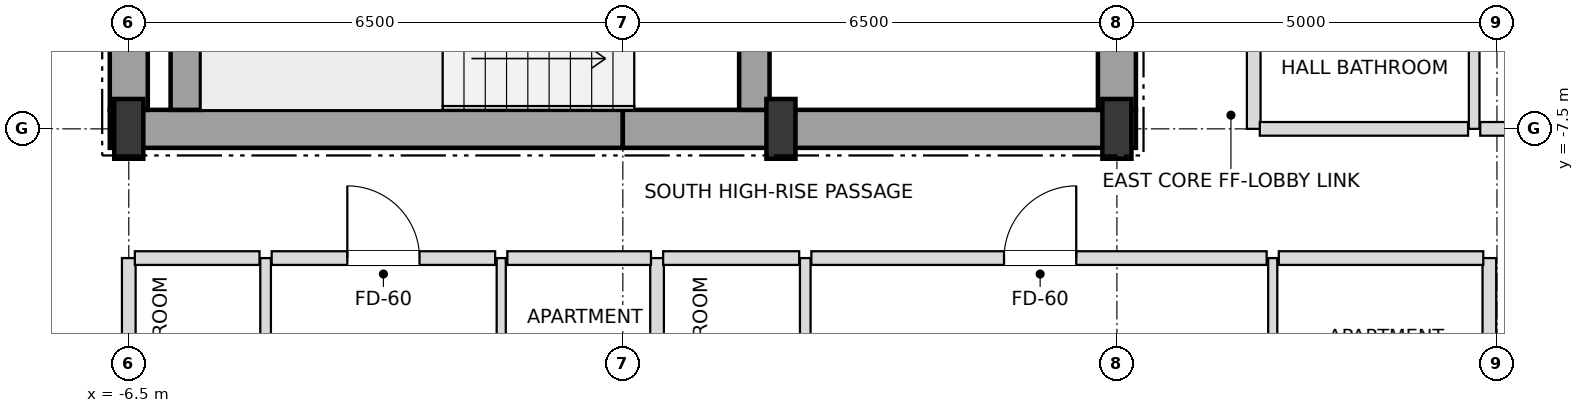
"""IFC4 building model, lengths in metres.
Left out: names, types, materials, properties, quantities, classifications, styles, units other than length and angle.
Written with IfcOpenShell. Run it as: python <this file> out.ifc"""

import sys

from ifc_helpers import new_model, si_unit, direction, frame, frame_2d, origin, origin_2d, place, context, subcontext, project, spatial, rectangle, i_section, extrude, element, fill, save


model = new_model("IFC4")
c1 = context("Model", 3, precision=1e-05, world=origin(), true_north=direction((0.0, 1.0)))
c2 = subcontext(c1, "Body", "Model", "MODEL_VIEW")
j1 = project(units=[si_unit("LENGTHUNIT", "METRE"), si_unit("PLANEANGLEUNIT", "RADIAN")], contexts=[c1])
p1 = place(None, origin())
s1 = spatial("IfcSite", under=j1, at=p1, CompositionType="ELEMENT")
p2 = place(p1, origin())
s2 = spatial("IfcBuilding", under=s1, at=p2, CompositionType="ELEMENT")
p3 = place(p2, frame((0.0, 0.0, 229.5)))
s3 = spatial("IfcBuildingStorey", under=s2, at=p3, CompositionType="ELEMENT", Elevation=229.5)
for number, where, z_axis, x_axis in (
    (1, (-6.5, -7.5, 0.0), (0.0, 0.0, 1.0), (1.0, 0.0, 0.0)),
    (2, (2.08, -7.5, 0.0), (0.0, 0.0, 1.0), (1.0, 0.0, 0.0)),
    (3, (6.5, -7.5, 0.0), (0.0, 0.0, 1.0), (1.0, 0.0, 0.0)),
):
    element("IfcColumn", number, at=place(p3, frame(where, z_axis=z_axis, x_axis=x_axis)), inside=s3, PredefinedType="COLUMN", context=c2, shape_type="SweptSolid", body=[
        extrude(i_section(OverallWidth=0.382, OverallDepth=0.786, WebThickness=0.02, FlangeThickness=0.033, at=origin_2d()), origin(), (0.0, 0.0, 1.0), 3.6),
    ])
for number, where, z_axis, x_axis in (
    (4, (-6.75, -7.5, 0.0), (0.0, 0.0, 1.0), (1.0, 0.0, 0.0)),
    (5, (0.0, -7.5, 0.0), (0.0, 0.0, 1.0), (1.0, 0.0, 0.0)),
):
    element("IfcWall", number, at=place(p3, frame(where, z_axis=z_axis, x_axis=x_axis)), inside=s3, PredefinedType="SHEAR", context=c2, shape_type="SweptSolid", body=[
        extrude(rectangle(XDim=6.75, YDim=0.5, at=frame_2d((3.375, 0.0))), origin(), (0.0, 0.0, 1.0), 3.38),
    ])
p4 = place(p3, frame((-6.5, -7.25, 0.0), z_axis=(0.0, 0.0, 1.0), x_axis=(0.0, 1.0, 0.0)))
e6 = element("IfcWall", 6, at=p4, inside=s3, PredefinedType="SHEAR", context=c2, shape_type="SweptSolid", body=[
    extrude(rectangle(XDim=3.55, YDim=0.5, at=frame_2d((1.775, 0.0))), origin(), (0.0, 0.0, 1.0), 3.38),
])
p5 = place(p3, frame((6.5, -7.25, 0.0), z_axis=(0.0, 0.0, 1.0), x_axis=(0.0, 1.0, 0.0)))
e7 = element("IfcWall", 7, at=p5, inside=s3, PredefinedType="SHEAR", context=c2, shape_type="SweptSolid", body=[
    extrude(rectangle(XDim=5.75, YDim=0.5, at=frame_2d((2.875, 0.0))), origin(), (0.0, 0.0, 1.0), 3.38),
])
p6 = place(p5, frame((0.85, 0.0, 0.0)))
e8 = element("IfcOpeningElement", 8, at=p6, cuts=e7, PredefinedType="OPENING", context=c2, shape_type="SweptSolid", body=[
    extrude(rectangle(XDim=1.05, YDim=2.15, at=frame_2d((0.525, 1.075))), frame((0.0, 0.26, 0.0), z_axis=(0.0, -1.0, 0.0), x_axis=(1.0, 0.0, 0.0)), (0.0, 0.0, 1.0), 0.52),
])
p7 = place(p3, frame((-5.75, -7.25, 0.0), z_axis=(0.0, 0.0, 1.0), x_axis=(0.0, 1.0, 0.0)))
e9 = element("IfcWall", 9, at=p7, inside=s3, PredefinedType="SHEAR", context=c2, shape_type="SweptSolid", body=[
    extrude(rectangle(XDim=2.9, YDim=0.4, at=frame_2d((1.45, 0.0))), origin(), (0.0, 0.0, 1.0), 3.38),
])
p8 = place(p3, frame((1.73, -7.25, 0.0), z_axis=(0.0, 0.0, 1.0), x_axis=(0.0, 1.0, 0.0)))
e10 = element("IfcWall", 10, at=p8, inside=s3, PredefinedType="SHEAR", context=c2, shape_type="SweptSolid", body=[
    extrude(rectangle(XDim=3.3, YDim=0.4, at=frame_2d((1.65, 0.0))), origin(), (0.0, 0.0, 1.0), 3.38),
])
p9 = place(p8, frame((0.9, 0.0, 0.0)))
e11 = element("IfcOpeningElement", 11, at=p9, cuts=e10, PredefinedType="OPENING", context=c2, shape_type="SweptSolid", body=[
    extrude(rectangle(XDim=1.05, YDim=2.15, at=frame_2d((0.525, 1.075))), frame((0.0, 0.21, 0.0), z_axis=(0.0, -1.0, 0.0), x_axis=(1.0, 0.0, 0.0)), (0.0, 0.0, 1.0), 0.42),
])
p10 = place(p3, frame((-6.5, -19.9, 0.0), z_axis=(0.0, 0.0, 1.0), x_axis=(0.0, 1.0, 0.0)))
e12 = element("IfcWall", 12, at=p10, inside=s3, PredefinedType="PARTITIONING", context=c2, shape_type="SweptSolid", body=[
    extrude(rectangle(XDim=10.7, YDim=0.18, at=frame_2d((5.35, 0.0))), origin(), (0.0, 0.0, 1.0), 2.826),
])
p11 = place(p3, frame((-4.7, -13.9, 0.0), z_axis=(0.0, 0.0, 1.0), x_axis=(0.0, 1.0, 0.0)))
e13 = element("IfcWall", 13, at=p11, inside=s3, PredefinedType="PARTITIONING", context=c2, shape_type="SweptSolid", body=[
    extrude(rectangle(XDim=4.7, YDim=0.14, at=frame_2d((2.35, 0.0))), origin(), (0.0, 0.0, 1.0), 3.38),
])
p12 = place(p11, frame((1.9, 0.0, 0.0)))
e14 = element("IfcOpeningElement", 14, at=p12, cuts=e13, PredefinedType="OPENING", context=c2, shape_type="SweptSolid", body=[
    extrude(rectangle(XDim=0.9, YDim=2.1, at=frame_2d((0.45, 1.05))), frame((0.0, 0.08, 0.0), z_axis=(0.0, -1.0, 0.0), x_axis=(1.0, 0.0, 0.0)), (0.0, 0.0, 1.0), 0.16),
])
p13 = place(p3, frame((-1.6, -13.9, 0.0), z_axis=(0.0, 0.0, 1.0), x_axis=(0.0, 1.0, 0.0)))
e15 = element("IfcWall", 15, at=p13, inside=s3, PredefinedType="PARTITIONING", context=c2, shape_type="SweptSolid", body=[
    extrude(rectangle(XDim=4.7, YDim=0.12, at=frame_2d((2.35, 0.0))), origin(), (0.0, 0.0, 1.0), 3.38),
])
p14 = place(p13, frame((1.875, 0.0, 0.0)))
e16 = element("IfcOpeningElement", 16, at=p14, cuts=e15, PredefinedType="OPENING", context=c2, shape_type="SweptSolid", body=[
    extrude(rectangle(XDim=0.95, YDim=2.1, at=frame_2d((0.475, 1.05))), frame((0.0, 0.07, 0.0), z_axis=(0.0, -1.0, 0.0), x_axis=(1.0, 0.0, 0.0)), (0.0, 0.0, 1.0), 0.14),
])
p15 = place(p3, frame((0.45, -19.9, 0.0), z_axis=(0.0, 0.0, 1.0), x_axis=(0.0, 1.0, 0.0)))
e17 = element("IfcWall", 17, at=p15, inside=s3, PredefinedType="PARTITIONING", context=c2, shape_type="SweptSolid", body=[
    extrude(rectangle(XDim=10.7, YDim=0.18, at=frame_2d((5.35, 0.0))), origin(), (0.0, 0.0, 1.0), 3.018),
])
p16 = place(p3, frame((2.4, -13.9, 0.0), z_axis=(0.0, 0.0, 1.0), x_axis=(0.0, 1.0, 0.0)))
e18 = element("IfcWall", 18, at=p16, inside=s3, PredefinedType="PARTITIONING", context=c2, shape_type="SweptSolid", body=[
    extrude(rectangle(XDim=4.7, YDim=0.14, at=frame_2d((2.35, 0.0))), origin(), (0.0, 0.0, 1.0), 3.38),
])
p17 = place(p16, frame((1.9, 0.0, 0.0)))
e19 = element("IfcOpeningElement", 19, at=p17, cuts=e18, PredefinedType="OPENING", context=c2, shape_type="SweptSolid", body=[
    extrude(rectangle(XDim=0.9, YDim=2.1, at=frame_2d((0.45, 1.05))), frame((0.0, 0.08, 0.0), z_axis=(0.0, -1.0, 0.0), x_axis=(1.0, 0.0, 0.0)), (0.0, 0.0, 1.0), 0.16),
])
p18 = place(p3, frame((8.3, -7.5, 0.0), z_axis=(0.0, 0.0, 1.0), x_axis=(0.0, 1.0, 0.0)))
e20 = element("IfcWall", 20, at=p18, inside=s3, PredefinedType="PARTITIONING", context=c2, shape_type="SweptSolid", body=[
    extrude(rectangle(XDim=15.0, YDim=0.18, at=frame_2d((7.5, 0.0))), origin(), (0.0, 0.0, 1.0), 3.38),
])
p19 = place(p18, frame((2.355, 0.0, 0.0)))
e21 = element("IfcOpeningElement", 21, at=p19, cuts=e20, PredefinedType="OPENING", context=c2, shape_type="SweptSolid", body=[
    extrude(rectangle(XDim=0.95, YDim=2.15, at=frame_2d((0.475, 1.075))), frame((0.0, 0.1, 0.0), z_axis=(0.0, -1.0, 0.0), x_axis=(1.0, 0.0, 0.0)), (0.0, 0.0, 1.0), 0.2),
])
p20 = place(p3, frame((8.55, -19.9, 0.0), z_axis=(0.0, 0.0, 1.0), x_axis=(0.0, 1.0, 0.0)))
e22 = element("IfcWall", 22, at=p20, inside=s3, PredefinedType="PARTITIONING", context=c2, shape_type="SweptSolid", body=[
    extrude(rectangle(XDim=10.7, YDim=0.12, at=frame_2d((5.35, 0.0))), origin(), (0.0, 0.0, 1.0), 2.826),
])
p21 = place(p20, frame((7.875, 0.0, 0.0)))
e23 = element("IfcOpeningElement", 23, at=p21, cuts=e22, PredefinedType="OPENING", context=c2, shape_type="SweptSolid", body=[
    extrude(rectangle(XDim=0.95, YDim=2.1, at=frame_2d((0.475, 1.05))), frame((0.0, 0.07, 0.0), z_axis=(0.0, -1.0, 0.0), x_axis=(1.0, 0.0, 0.0)), (0.0, 0.0, 1.0), 0.14),
])
p22 = place(p20, frame((2.55, 0.0, 0.0)))
e24 = element("IfcOpeningElement", 24, at=p22, cuts=e22, PredefinedType="OPENING", context=c2, shape_type="SweptSolid", body=[
    extrude(rectangle(XDim=0.9, YDim=2.1, at=frame_2d((0.45, 1.05))), frame((0.0, 0.07, 0.0), z_axis=(0.0, -1.0, 0.0), x_axis=(1.0, 0.0, 0.0)), (0.0, 0.0, 1.0), 0.14),
])
p23 = place(p3, frame((11.2, -7.5, 0.0), z_axis=(0.0, 0.0, 1.0), x_axis=(0.0, 1.0, 0.0)))
e25 = element("IfcWall", 25, at=p23, inside=s3, PredefinedType="PARTITIONING", context=c2, shape_type="SweptSolid", body=[
    extrude(rectangle(XDim=15.0, YDim=0.14, at=frame_2d((7.5, 0.0))), origin(), (0.0, 0.0, 1.0), 3.38),
])
p24 = place(p23, frame((3.475, 0.0, 0.0)))
e26 = element("IfcOpeningElement", 26, at=p24, cuts=e25, PredefinedType="OPENING", context=c2, shape_type="SweptSolid", body=[
    extrude(rectangle(XDim=0.95, YDim=2.1, at=frame_2d((0.475, 1.05))), frame((0.0, 0.08, 0.0), z_axis=(0.0, -1.0, 0.0), x_axis=(1.0, 0.0, 0.0)), (0.0, 0.0, 1.0), 0.16),
])
p25 = place(p3, frame((11.4, -14.27, 0.0), z_axis=(0.0, 0.0, 1.0), x_axis=(0.0, 1.0, 0.0)))
e27 = element("IfcWall", 27, at=p25, inside=s3, PredefinedType="PARTITIONING", context=c2, shape_type="SweptSolid", body=[
    extrude(rectangle(XDim=5.07, YDim=0.18, at=frame_2d((2.535, 0.0))), origin(), (0.0, 0.0, 1.0), 2.748),
])
p26 = place(p3, frame((-6.42, -9.2, 0.0), z_axis=(0.0, 0.0, 1.0), x_axis=(1.0, 0.0, 0.0)))
e28 = element("IfcWall", 28, at=p26, inside=s3, PredefinedType="PARTITIONING", context=c2, shape_type="SweptSolid", body=[
    extrude(rectangle(XDim=1.64, YDim=0.18, at=frame_2d((0.82, 0.0))), origin(), (0.0, 0.0, 1.0), 3.38),
])
p27 = place(p3, frame((-4.62, -9.2, 0.0), z_axis=(0.0, 0.0, 1.0), x_axis=(1.0, 0.0, 0.0)))
e29 = element("IfcWall", 29, at=p27, inside=s3, PredefinedType="PARTITIONING", context=c2, shape_type="SweptSolid", body=[
    extrude(rectangle(XDim=2.94, YDim=0.18, at=frame_2d((1.47, 0.0))), origin(), (0.0, 0.0, 1.0), 3.38),
])
p28 = place(p27, frame((0.995, 0.0, 0.0)))
e30 = element("IfcOpeningElement", 30, at=p28, cuts=e29, PredefinedType="OPENING", context=c2, shape_type="SweptSolid", body=[
    extrude(rectangle(XDim=0.95, YDim=2.15, at=frame_2d((0.475, 1.075))), frame((0.0, 0.1, 0.0), z_axis=(0.0, -1.0, 0.0), x_axis=(1.0, 0.0, 0.0)), (0.0, 0.0, 1.0), 0.2),
])
p29 = place(p3, frame((-1.52, -9.2, 0.0), z_axis=(0.0, 0.0, 1.0), x_axis=(1.0, 0.0, 0.0)))
e31 = element("IfcWall", 31, at=p29, inside=s3, PredefinedType="PARTITIONING", context=c2, shape_type="SweptSolid", body=[
    extrude(rectangle(XDim=1.89, YDim=0.18, at=frame_2d((0.945, 0.0))), origin(), (0.0, 0.0, 1.0), 3.38),
])
p30 = place(p3, frame((0.53, -9.2, 0.0), z_axis=(0.0, 0.0, 1.0), x_axis=(1.0, 0.0, 0.0)))
e32 = element("IfcWall", 32, at=p30, inside=s3, PredefinedType="PARTITIONING", context=c2, shape_type="SweptSolid", body=[
    extrude(rectangle(XDim=1.79, YDim=0.18, at=frame_2d((0.895, 0.0))), origin(), (0.0, 0.0, 1.0), 3.38),
])
p31 = place(p3, frame((2.48, -9.2, 0.0), z_axis=(0.0, 0.0, 1.0), x_axis=(1.0, 0.0, 0.0)))
e33 = element("IfcWall", 33, at=p31, inside=s3, PredefinedType="PARTITIONING", context=c2, shape_type="SweptSolid", body=[
    extrude(rectangle(XDim=5.99, YDim=0.18, at=frame_2d((2.995, 0.0))), origin(), (0.0, 0.0, 1.0), 2.826),
])
p32 = place(p31, frame((2.535, 0.0, 0.0)))
e34 = element("IfcOpeningElement", 34, at=p32, cuts=e33, PredefinedType="OPENING", context=c2, shape_type="SweptSolid", body=[
    extrude(rectangle(XDim=0.95, YDim=2.15, at=frame_2d((0.475, 1.075))), frame((0.0, 0.1, 0.0), z_axis=(0.0, -1.0, 0.0), x_axis=(1.0, 0.0, 0.0)), (0.0, 0.0, 1.0), 0.2),
])
p33 = place(p3, frame((8.63, -9.2, 0.0), z_axis=(0.0, 0.0, 1.0), x_axis=(1.0, 0.0, 0.0)))
e35 = element("IfcWall", 35, at=p33, inside=s3, PredefinedType="PARTITIONING", context=c2, shape_type="SweptSolid", body=[
    extrude(rectangle(XDim=2.69, YDim=0.18, at=frame_2d((1.345, 0.0))), origin(), (0.0, 0.0, 1.0), 3.38),
])
p34 = place(p3, frame((8.38, -7.5, 0.0), z_axis=(0.0, 0.0, 1.0), x_axis=(1.0, 0.0, 0.0)))
e36 = element("IfcWall", 36, at=p34, inside=s3, PredefinedType="PARTITIONING", context=c2, shape_type="SweptSolid", body=[
    extrude(rectangle(XDim=2.74, YDim=0.18, at=frame_2d((1.37, 0.0))), origin(), (0.0, 0.0, 1.0), 2.826),
])
p35 = place(p3, frame((11.28, -7.5, 0.0), z_axis=(0.0, 0.0, 1.0), x_axis=(1.0, 0.0, 0.0)))
e37 = element("IfcWall", 37, at=p35, inside=s3, PredefinedType="PARTITIONING", context=c2, shape_type="SweptSolid", body=[
    extrude(rectangle(XDim=5.62, YDim=0.18, at=frame_2d((2.81, 0.0))), origin(), (0.0, 0.0, 1.0), 2.826),
])
p36 = place(p28, origin())
e38 = element("IfcDoor", 38, at=p36, inside=s3, OperationType="SINGLE_SWING_LEFT", PredefinedType="DOOR", context=c2, shape_type="SweptSolid", body=[
    extrude(rectangle(XDim=0.95, YDim=2.15, at=frame_2d((0.475, 1.075))), frame((0.0, 0.025, 0.0), z_axis=(0.0, -1.0, 0.0), x_axis=(1.0, 0.0, 0.0)), (0.0, 0.0, 1.0), 0.05),
])
fill(e30, e38)
p37 = place(p32, origin())
e39 = element("IfcDoor", 39, at=p37, inside=s3, OperationType="SINGLE_SWING_RIGHT", PredefinedType="DOOR", context=c2, shape_type="SweptSolid", body=[
    extrude(rectangle(XDim=0.95, YDim=2.15, at=frame_2d((0.475, 1.075))), frame((0.0, 0.025, 0.0), z_axis=(0.0, -1.0, 0.0), x_axis=(1.0, 0.0, 0.0)), (0.0, 0.0, 1.0), 0.05),
])
fill(e34, e39)
save(model, sys.argv[1])
